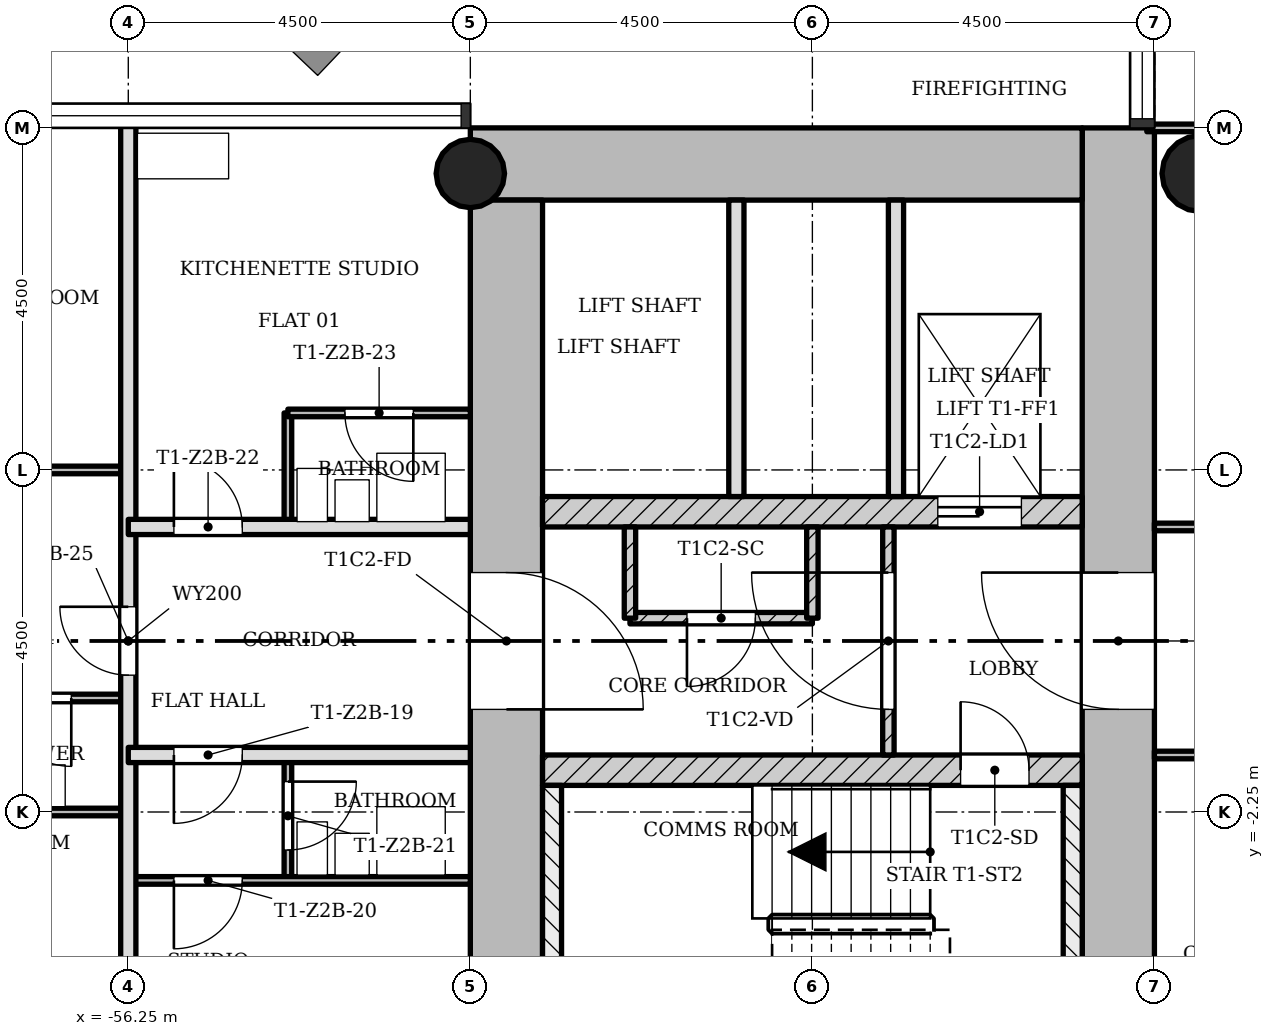
"""IFC4 building model, lengths in metres.
Left out: names, types, materials, properties, quantities, classifications, styles, units other than length and angle.
Written with IfcOpenShell. Run it as: python <this file> out.ifc"""

import sys

from ifc_helpers import new_model, si_unit, direction, frame, frame_2d, origin, origin_2d, place, context, subcontext, project, spatial, rectangle, hollow_circle, extrude, element, fill, save


model = new_model("IFC4")
c1 = context("Model", 3, precision=1e-05, world=origin(), true_north=direction((0.0, 1.0)))
c2 = subcontext(c1, "Body", "Model", "MODEL_VIEW")
j1 = project(units=[si_unit("LENGTHUNIT", "METRE"), si_unit("PLANEANGLEUNIT", "RADIAN")], contexts=[c1])
p1 = place(None, origin())
s1 = spatial("IfcSite", under=j1, at=p1, CompositionType="ELEMENT")
p2 = place(p1, origin())
s2 = spatial("IfcBuilding", under=s1, at=p2, CompositionType="ELEMENT")
p3 = place(p2, frame((0.0, 0.0, 80.0)))
s3 = spatial("IfcBuildingStorey", under=s2, at=p3, CompositionType="ELEMENT", Elevation=80.0)
p4 = place(p3, frame((-43.225, -5.8, 0.0), z_axis=(0.0, 0.0, 1.0), x_axis=(0.0, 1.0, 0.0)))
e1 = element("IfcWall", 1, at=p4, inside=s3, PredefinedType="SHEAR", context=c2, shape_type="SweptSolid", body=[
    extrude(rectangle(XDim=12.55, YDim=0.95, at=frame_2d((6.275, 0.0))), origin(), (0.0, 0.0, 1.0), 3.4),
])
p5 = place(p4, frame((4.9, 0.0, 0.0)))
e2 = element("IfcOpeningElement", 2, at=p5, cuts=e1, PredefinedType="OPENING", context=c2, shape_type="SweptSolid", body=[
    extrude(rectangle(XDim=1.8, YDim=2.1, at=frame_2d((0.9, 1.05))), frame((0.0, 0.485, 0.0), z_axis=(0.0, -1.0, 0.0), x_axis=(1.0, 0.0, 0.0)), (0.0, 0.0, 1.0), 0.97),
])
p6 = place(p3, frame((-43.7, 6.275, 0.0), z_axis=(0.0, 0.0, 1.0), x_axis=(-1.0, 0.0, 0.0)))
e3 = element("IfcWall", 3, at=p6, inside=s3, PredefinedType="SHEAR", context=c2, shape_type="SweptSolid", body=[
    extrude(rectangle(XDim=8.05, YDim=0.95, at=frame_2d((4.025, 0.0))), origin(), (0.0, 0.0, 1.0), 3.4),
])
p7 = place(p3, frame((-51.275, 5.8, 0.0), z_axis=(0.0, 0.0, 1.0), x_axis=(0.0, -1.0, 0.0)))
e4 = element("IfcWall", 4, at=p7, inside=s3, PredefinedType="SHEAR", context=c2, shape_type="SweptSolid", body=[
    extrude(rectangle(XDim=12.55, YDim=0.95, at=frame_2d((6.275, 0.0))), origin(), (0.0, 0.0, 1.0), 3.4),
])
p8 = place(p7, frame((4.9, 0.0, 0.0)))
e5 = element("IfcOpeningElement", 5, at=p8, cuts=e4, PredefinedType="OPENING", context=c2, shape_type="SweptSolid", body=[
    extrude(rectangle(XDim=1.8, YDim=2.1, at=frame_2d((0.9, 1.05))), frame((0.0, 0.485, 0.0), z_axis=(0.0, -1.0, 0.0), x_axis=(1.0, 0.0, 0.0)), (0.0, 0.0, 1.0), 0.97),
])
p9 = place(p3, frame((-50.8, -1.7, 0.0), z_axis=(0.0, 0.0, 1.0), x_axis=(1.0, 0.0, 0.0)))
e6 = element("IfcWall", 6, at=p9, inside=s3, PredefinedType="SHEAR", context=c2, shape_type="SweptSolid", body=[
    extrude(rectangle(XDim=7.1, YDim=0.4, at=frame_2d((3.55, 0.0))), origin(), (0.0, 0.0, 1.0), 3.4),
])
p10 = place(p9, frame((5.5, 0.0, 0.0)))
e7 = element("IfcOpeningElement", 7, at=p10, cuts=e6, PredefinedType="OPENING", context=c2, shape_type="SweptSolid", body=[
    extrude(rectangle(XDim=0.9, YDim=2.1, at=frame_2d((0.45, 1.05))), frame((0.0, 0.21, 0.0), z_axis=(0.0, -1.0, 0.0), x_axis=(1.0, 0.0, 0.0)), (0.0, 0.0, 1.0), 0.42),
])
p11 = place(p3, frame((-50.8, 1.7, 0.0), z_axis=(0.0, 0.0, 1.0), x_axis=(1.0, 0.0, 0.0)))
e8 = element("IfcWall", 8, at=p11, inside=s3, PredefinedType="SHEAR", context=c2, shape_type="SweptSolid", body=[
    extrude(rectangle(XDim=7.1, YDim=0.4, at=frame_2d((3.55, 0.0))), origin(), (0.0, 0.0, 1.0), 3.4),
])
p12 = place(p11, frame((5.2, 0.0, 0.0)))
e9 = element("IfcOpeningElement", 9, at=p12, cuts=e8, PredefinedType="OPENING", context=c2, shape_type="SweptSolid", body=[
    extrude(rectangle(XDim=1.1, YDim=2.1, at=frame_2d((0.55, 1.05))), frame((0.0, 0.21, 0.0), z_axis=(0.0, -1.0, 0.0), x_axis=(1.0, 0.0, 0.0)), (0.0, 0.0, 1.0), 0.42),
])
p13 = place(p3, frame((-51.75, 6.15, 0.0), z_axis=(0.0, 0.0, 1.0), x_axis=(1.0, 0.0, 0.0)))
e10 = element("IfcColumn", 10, at=p13, inside=s3, PredefinedType="COLUMN", context=c2, shape_type="SweptSolid", body=[
    extrude(hollow_circle(Radius=0.45, WallThickness=0.032, at=origin_2d()), origin(), (0.0, 0.0, 1.0), 3.4),
])
p14 = place(p3, frame((-42.15, 6.15, 0.0), z_axis=(0.0, 0.0, 1.0), x_axis=(1.0, 0.0, 0.0)))
e11 = element("IfcColumn", 11, at=p14, inside=s3, PredefinedType="COLUMN", context=c2, shape_type="SweptSolid", body=[
    extrude(hollow_circle(Radius=0.5, WallThickness=0.036, at=origin_2d()), origin(), (0.0, 0.0, 1.0), 3.4),
])
p15 = place(p3, frame((-46.25, 1.5, 0.0), z_axis=(0.0, 0.0, 1.0), x_axis=(0.0, -1.0, 0.0)))
e12 = element("IfcWall", 12, at=p15, inside=s3, PredefinedType="PARTITIONING", context=c2, shape_type="SweptSolid", body=[
    extrude(rectangle(XDim=3.0, YDim=0.15, at=frame_2d((1.5, 0.0))), origin(), (0.0, 0.0, 1.0), 3.0),
])
p16 = place(p15, frame((0.6, 0.0, 0.0)))
e13 = element("IfcOpeningElement", 13, at=p16, cuts=e12, PredefinedType="OPENING", context=c2, shape_type="SweptSolid", body=[
    extrude(rectangle(XDim=1.8, YDim=2.1, at=frame_2d((0.9, 1.05))), frame((0.0, 0.085, 0.0), z_axis=(0.0, -1.0, 0.0), x_axis=(1.0, 0.0, 0.0)), (0.0, 0.0, 1.0), 0.17),
])
for number, where, z_axis, x_axis in (
    (14, (-46.15, 5.8, 0.0), (0.0, 0.0, 1.0), (0.0, -1.0, 0.0)),
    (15, (-48.25, 5.8, 0.0), (0.0, 0.0, 1.0), (0.0, -1.0, 0.0)),
):
    element("IfcWall", number, at=place(p3, frame(where, z_axis=z_axis, x_axis=x_axis)), inside=s3, PredefinedType="SOLIDWALL", context=c2, shape_type="SweptSolid", body=[
        extrude(rectangle(XDim=3.9, YDim=0.2, at=frame_2d((1.95, 0.0))), origin(), (0.0, 0.0, 1.0), 3.0),
    ])
p17 = place(p3, frame((-47.25, 0.3, 0.0), z_axis=(0.0, 0.0, 1.0), x_axis=(-1.0, 0.0, 0.0)))
e16 = element("IfcWall", 16, at=p17, inside=s3, PredefinedType="PARTITIONING", context=c2, shape_type="SweptSolid", body=[
    extrude(rectangle(XDim=2.4, YDim=0.15, at=frame_2d((1.2, 0.0))), origin(), (0.0, 0.0, 1.0), 3.0),
])
p18 = place(p17, frame((0.75, 0.0, 0.0)))
e17 = element("IfcOpeningElement", 17, at=p18, cuts=e16, PredefinedType="OPENING", context=c2, shape_type="SweptSolid", body=[
    extrude(rectangle(XDim=0.9, YDim=2.1, at=frame_2d((0.45, 1.05))), frame((0.0, 0.085, 0.0), z_axis=(0.0, -1.0, 0.0), x_axis=(1.0, 0.0, 0.0)), (0.0, 0.0, 1.0), 0.17),
])
for number, where, z_axis, x_axis in (
    (18, (-47.25, 0.3, 0.0), (0.0, 0.0, 1.0), (0.0, 1.0, 0.0)),
    (19, (-49.65, 0.3, 0.0), (0.0, 0.0, 1.0), (0.0, 1.0, 0.0)),
):
    element("IfcWall", number, at=place(p3, frame(where, z_axis=z_axis, x_axis=x_axis)), inside=s3, PredefinedType="PARTITIONING", context=c2, shape_type="SweptSolid", body=[
        extrude(rectangle(XDim=1.2, YDim=0.15, at=frame_2d((0.6, 0.0))), origin(), (0.0, 0.0, 1.0), 3.0),
    ])
p19 = place(p3, frame((-56.25, -6.85, 0.0), z_axis=(0.0, 0.0, 1.0), x_axis=(0.0, 1.0, 0.0)))
e20 = element("IfcWall", 20, at=p19, inside=s3, PredefinedType="SOLIDWALL", context=c2, shape_type="SweptSolid", body=[
    extrude(rectangle(XDim=13.7, YDim=0.2, at=frame_2d((6.85, 0.0))), origin(), (0.0, 0.0, 1.0), 3.0),
])
p20 = place(p19, frame((6.4, 0.0, 0.0)))
e21 = element("IfcOpeningElement", 21, at=p20, cuts=e20, PredefinedType="OPENING", context=c2, shape_type="SweptSolid", body=[
    extrude(rectangle(XDim=0.9, YDim=2.1, at=frame_2d((0.45, 1.05))), frame((0.0, 0.11, 0.0), z_axis=(0.0, -1.0, 0.0), x_axis=(1.0, 0.0, 0.0)), (0.0, 0.0, 1.0), 0.22),
])
p21 = place(p3, frame((-54.15, -3.15, 0.0), z_axis=(0.0, 0.0, 1.0), x_axis=(0.0, 1.0, 0.0)))
e22 = element("IfcWall", 22, at=p21, inside=s3, PredefinedType="PARTITIONING", context=c2, shape_type="SweptSolid", body=[
    extrude(rectangle(XDim=1.65, YDim=0.1, at=frame_2d((0.825, 0.0))), origin(), (0.0, 0.0, 1.0), 3.0),
])
p22 = place(p21, frame((0.4, 0.0, 0.0)))
e23 = element("IfcOpeningElement", 23, at=p22, cuts=e22, PredefinedType="OPENING", context=c2, shape_type="SweptSolid", body=[
    extrude(rectangle(XDim=0.9, YDim=2.1, at=frame_2d((0.45, 1.05))), frame((0.0, 0.06, 0.0), z_axis=(0.0, -1.0, 0.0), x_axis=(1.0, 0.0, 0.0)), (0.0, 0.0, 1.0), 0.12),
])
p23 = place(p3, frame((-54.15, 1.5, 0.0), z_axis=(0.0, 0.0, 1.0), x_axis=(0.0, 1.0, 0.0)))
e24 = element("IfcWall", 24, at=p23, inside=s3, PredefinedType="PARTITIONING", context=c2, shape_type="SweptSolid", body=[
    extrude(rectangle(XDim=1.5, YDim=0.1, at=frame_2d((0.75, 0.0))), origin(), (0.0, 0.0, 1.0), 3.0),
])
p24 = place(p3, frame((-56.25, -3.15, 0.0), z_axis=(0.0, 0.0, 1.0), x_axis=(1.0, 0.0, 0.0)))
e25 = element("IfcWall", 25, at=p24, inside=s3, PredefinedType="PARTITIONING", context=c2, shape_type="SweptSolid", body=[
    extrude(rectangle(XDim=4.5, YDim=0.1, at=frame_2d((2.25, 0.0))), origin(), (0.0, 0.0, 1.0), 3.0),
])
p25 = place(p24, frame((0.6, 0.0, 0.0)))
e26 = element("IfcOpeningElement", 26, at=p25, cuts=e25, PredefinedType="OPENING", context=c2, shape_type="SweptSolid", body=[
    extrude(rectangle(XDim=0.9, YDim=2.1, at=frame_2d((0.45, 1.05))), frame((0.0, 0.06, 0.0), z_axis=(0.0, -1.0, 0.0), x_axis=(1.0, 0.0, 0.0)), (0.0, 0.0, 1.0), 0.12),
])
p26 = place(p3, frame((-60.85, -2.25, 0.0), z_axis=(0.0, 0.0, 1.0), x_axis=(1.0, 0.0, 0.0)))
e27 = element("IfcWall", 27, at=p26, inside=s3, PredefinedType="PARTITIONING", context=c2, shape_type="SweptSolid", body=[
    extrude(rectangle(XDim=4.6, YDim=0.1, at=frame_2d((2.3, 0.0))), origin(), (0.0, 0.0, 1.0), 3.0),
])
p27 = place(p26, frame((1.25, 0.0, 0.0)))
e28 = element("IfcOpeningElement", 28, at=p27, cuts=e27, PredefinedType="OPENING", context=c2, shape_type="SweptSolid", body=[
    extrude(rectangle(XDim=0.9, YDim=2.1, at=frame_2d((0.45, 1.05))), frame((0.0, 0.06, 0.0), z_axis=(0.0, -1.0, 0.0), x_axis=(1.0, 0.0, 0.0)), (0.0, 0.0, 1.0), 0.12),
])
p28 = place(p3, frame((-42.75, -1.5, 0.0), z_axis=(0.0, 0.0, 1.0), x_axis=(1.0, 0.0, 0.0)))
e29 = element("IfcWall", 29, at=p28, inside=s3, PredefinedType="PARTITIONING", context=c2, shape_type="SweptSolid", body=[
    extrude(rectangle(XDim=5.85, YDim=0.1, at=frame_2d((2.925, 0.0))), origin(), (0.0, 0.0, 1.0), 3.0),
])
p29 = place(p28, frame((0.975, 0.0, 0.0)))
e30 = element("IfcOpeningElement", 30, at=p29, cuts=e29, PredefinedType="OPENING", context=c2, shape_type="SweptSolid", body=[
    extrude(rectangle(XDim=0.9, YDim=2.1, at=frame_2d((0.45, 1.05))), frame((0.0, 0.06, 0.0), z_axis=(0.0, -1.0, 0.0), x_axis=(1.0, 0.0, 0.0)), (0.0, 0.0, 1.0), 0.12),
])
p30 = place(p3, frame((-56.25, -1.5, 0.0), z_axis=(0.0, 0.0, 1.0), x_axis=(1.0, 0.0, 0.0)))
e31 = element("IfcWall", 31, at=p30, inside=s3, PredefinedType="SOLIDWALL", context=c2, shape_type="SweptSolid", body=[
    extrude(rectangle(XDim=4.5, YDim=0.2, at=frame_2d((2.25, 0.0))), origin(), (0.0, 0.0, 1.0), 3.0),
])
p31 = place(p30, frame((0.6, 0.0, 0.0)))
e32 = element("IfcOpeningElement", 32, at=p31, cuts=e31, PredefinedType="OPENING", context=c2, shape_type="SweptSolid", body=[
    extrude(rectangle(XDim=0.9, YDim=2.1, at=frame_2d((0.45, 1.05))), frame((0.0, 0.11, 0.0), z_axis=(0.0, -1.0, 0.0), x_axis=(1.0, 0.0, 0.0)), (0.0, 0.0, 1.0), 0.22),
])
p32 = place(p3, frame((-58.65, -0.75, 0.0), z_axis=(0.0, 0.0, 1.0), x_axis=(1.0, 0.0, 0.0)))
e33 = element("IfcWall", 33, at=p32, inside=s3, PredefinedType="PARTITIONING", context=c2, shape_type="SweptSolid", body=[
    extrude(rectangle(XDim=2.4, YDim=0.1, at=frame_2d((1.2, 0.0))), origin(), (0.0, 0.0, 1.0), 3.0),
])
p33 = place(p32, frame((0.75, 0.0, 0.0)))
e34 = element("IfcOpeningElement", 34, at=p33, cuts=e33, PredefinedType="OPENING", context=c2, shape_type="SweptSolid", body=[
    extrude(rectangle(XDim=0.9, YDim=2.1, at=frame_2d((0.45, 1.05))), frame((0.0, 0.06, 0.0), z_axis=(0.0, -1.0, 0.0), x_axis=(1.0, 0.0, 0.0)), (0.0, 0.0, 1.0), 0.12),
])
p34 = place(p3, frame((-42.75, 1.5, 0.0), z_axis=(0.0, 0.0, 1.0), x_axis=(1.0, 0.0, 0.0)))
e35 = element("IfcWall", 35, at=p34, inside=s3, PredefinedType="PARTITIONING", context=c2, shape_type="SweptSolid", body=[
    extrude(rectangle(XDim=5.85, YDim=0.1, at=frame_2d((2.925, 0.0))), origin(), (0.0, 0.0, 1.0), 3.0),
])
p35 = place(p34, frame((1.575, 0.0, 0.0)))
e36 = element("IfcOpeningElement", 36, at=p35, cuts=e35, PredefinedType="OPENING", context=c2, shape_type="SweptSolid", body=[
    extrude(rectangle(XDim=0.9, YDim=2.1, at=frame_2d((0.45, 1.05))), frame((0.0, 0.06, 0.0), z_axis=(0.0, -1.0, 0.0), x_axis=(1.0, 0.0, 0.0)), (0.0, 0.0, 1.0), 0.12),
])
p36 = place(p3, frame((-56.25, 1.5, 0.0), z_axis=(0.0, 0.0, 1.0), x_axis=(1.0, 0.0, 0.0)))
e37 = element("IfcWall", 37, at=p36, inside=s3, PredefinedType="SOLIDWALL", context=c2, shape_type="SweptSolid", body=[
    extrude(rectangle(XDim=4.5, YDim=0.2, at=frame_2d((2.25, 0.0))), origin(), (0.0, 0.0, 1.0), 3.0),
])
p37 = place(p36, frame((0.6, 0.0, 0.0)))
e38 = element("IfcOpeningElement", 38, at=p37, cuts=e37, PredefinedType="OPENING", context=c2, shape_type="SweptSolid", body=[
    extrude(rectangle(XDim=0.9, YDim=2.1, at=frame_2d((0.45, 1.05))), frame((0.0, 0.11, 0.0), z_axis=(0.0, -1.0, 0.0), x_axis=(1.0, 0.0, 0.0)), (0.0, 0.0, 1.0), 0.22),
])
p38 = place(p3, frame((-60.85, 2.25, 0.0), z_axis=(0.0, 0.0, 1.0), x_axis=(1.0, 0.0, 0.0)))
e39 = element("IfcWall", 39, at=p38, inside=s3, PredefinedType="PARTITIONING", context=c2, shape_type="SweptSolid", body=[
    extrude(rectangle(XDim=4.6, YDim=0.1, at=frame_2d((2.3, 0.0))), origin(), (0.0, 0.0, 1.0), 3.0),
])
p39 = place(p38, frame((1.9, 0.0, 0.0)))
e40 = element("IfcOpeningElement", 40, at=p39, cuts=e39, PredefinedType="OPENING", context=c2, shape_type="SweptSolid", body=[
    extrude(rectangle(XDim=0.9, YDim=2.1, at=frame_2d((0.45, 1.05))), frame((0.0, 0.06, 0.0), z_axis=(0.0, -1.0, 0.0), x_axis=(1.0, 0.0, 0.0)), (0.0, 0.0, 1.0), 0.12),
])
p40 = place(p3, frame((-54.15, 3.0, 0.0), z_axis=(0.0, 0.0, 1.0), x_axis=(1.0, 0.0, 0.0)))
e41 = element("IfcWall", 41, at=p40, inside=s3, PredefinedType="PARTITIONING", context=c2, shape_type="SweptSolid", body=[
    extrude(rectangle(XDim=2.4, YDim=0.1, at=frame_2d((1.2, 0.0))), origin(), (0.0, 0.0, 1.0), 3.0),
])
p41 = place(p40, frame((0.75, 0.0, 0.0)))
e42 = element("IfcOpeningElement", 42, at=p41, cuts=e41, PredefinedType="OPENING", context=c2, shape_type="SweptSolid", body=[
    extrude(rectangle(XDim=0.9, YDim=2.1, at=frame_2d((0.45, 1.05))), frame((0.0, 0.06, 0.0), z_axis=(0.0, -1.0, 0.0), x_axis=(1.0, 0.0, 0.0)), (0.0, 0.0, 1.0), 0.12),
])
p42 = place(p3, frame((-42.85, 6.75, 0.0), z_axis=(0.0, 0.0, 1.0), x_axis=(1.0, 0.0, 0.0)))
e43 = element("IfcWall", 43, at=p42, inside=s3, PredefinedType="PARTITIONING", context=c2, shape_type="SweptSolid", body=[
    extrude(rectangle(XDim=5.95, YDim=0.1, at=frame_2d((2.975, 0.0))), origin(), (0.0, 0.0, 1.0), 3.0),
])
for number, where, z_axis, x_axis in (
    (44, (-50.675, -1.9, 0.0), (0.0, 0.0, 1.0), (0.0, -1.0, 0.0)),
    (45, (-43.825, -1.9, 0.0), (0.0, 0.0, 1.0), (0.0, -1.0, 0.0)),
):
    element("IfcWall", number, at=place(p3, frame(where, z_axis=z_axis, x_axis=x_axis)), inside=s3, PredefinedType="SHEAR", context=c2, shape_type="SweptSolid", body=[
        extrude(rectangle(XDim=3.9, YDim=0.25, at=frame_2d((1.95, 0.0))), origin(), (0.0, 0.0, 1.0), 3.4),
    ])
p43 = place(p16, origin())
e46 = element("IfcDoor", 46, at=p43, inside=s3, OperationType="SINGLE_SWING_LEFT", PredefinedType="DOOR", context=c2, shape_type="SweptSolid", body=[
    extrude(rectangle(XDim=1.8, YDim=2.1, at=frame_2d((0.9, 1.05))), frame((0.0, 0.025, 0.0), z_axis=(0.0, -1.0, 0.0), x_axis=(1.0, 0.0, 0.0)), (0.0, 0.0, 1.0), 0.05),
])
fill(e13, e46)
p44 = place(p18, origin())
e47 = element("IfcDoor", 47, at=p44, inside=s3, OperationType="SINGLE_SWING_LEFT", PredefinedType="DOOR", context=c2, shape_type="SweptSolid", body=[
    extrude(rectangle(XDim=0.9, YDim=2.1, at=frame_2d((0.45, 1.05))), frame((0.0, 0.025, 0.0), z_axis=(0.0, -1.0, 0.0), x_axis=(1.0, 0.0, 0.0)), (0.0, 0.0, 1.0), 0.05),
])
fill(e17, e47)
p45 = place(p31, origin())
e48 = element("IfcDoor", 48, at=p45, inside=s3, OperationType="SINGLE_SWING_LEFT", PredefinedType="DOOR", context=c2, shape_type="SweptSolid", body=[
    extrude(rectangle(XDim=0.9, YDim=2.1, at=frame_2d((0.45, 1.05))), frame((0.0, 0.025, 0.0), z_axis=(0.0, -1.0, 0.0), x_axis=(1.0, 0.0, 0.0)), (0.0, 0.0, 1.0), 0.05),
])
fill(e32, e48)
p46 = place(p25, origin())
e49 = element("IfcDoor", 49, at=p46, inside=s3, OperationType="SINGLE_SWING_LEFT", PredefinedType="DOOR", context=c2, shape_type="SweptSolid", body=[
    extrude(rectangle(XDim=0.9, YDim=2.1, at=frame_2d((0.45, 1.05))), frame((0.0, 0.025, 0.0), z_axis=(0.0, -1.0, 0.0), x_axis=(1.0, 0.0, 0.0)), (0.0, 0.0, 1.0), 0.05),
])
fill(e26, e49)
p47 = place(p22, origin())
e50 = element("IfcDoor", 50, at=p47, inside=s3, OperationType="SINGLE_SWING_RIGHT", PredefinedType="DOOR", context=c2, shape_type="SweptSolid", body=[
    extrude(rectangle(XDim=0.9, YDim=2.1, at=frame_2d((0.45, 1.05))), frame((0.0, 0.025, 0.0), z_axis=(0.0, -1.0, 0.0), x_axis=(1.0, 0.0, 0.0)), (0.0, 0.0, 1.0), 0.05),
])
fill(e23, e50)
p48 = place(p37, origin())
e51 = element("IfcDoor", 51, at=p48, inside=s3, OperationType="SINGLE_SWING_RIGHT", PredefinedType="DOOR", context=c2, shape_type="SweptSolid", body=[
    extrude(rectangle(XDim=0.9, YDim=2.1, at=frame_2d((0.45, 1.05))), frame((0.0, 0.025, 0.0), z_axis=(0.0, -1.0, 0.0), x_axis=(1.0, 0.0, 0.0)), (0.0, 0.0, 1.0), 0.05),
])
fill(e38, e51)
p49 = place(p41, origin())
e52 = element("IfcDoor", 52, at=p49, inside=s3, OperationType="SINGLE_SWING_RIGHT", PredefinedType="DOOR", context=c2, shape_type="SweptSolid", body=[
    extrude(rectangle(XDim=0.9, YDim=2.1, at=frame_2d((0.45, 1.05))), frame((0.0, 0.025, 0.0), z_axis=(0.0, -1.0, 0.0), x_axis=(1.0, 0.0, 0.0)), (0.0, 0.0, 1.0), 0.05),
])
fill(e42, e52)
p50 = place(p33, origin())
e53 = element("IfcDoor", 53, at=p50, inside=s3, OperationType="SINGLE_SWING_RIGHT", PredefinedType="DOOR", context=c2, shape_type="SweptSolid", body=[
    extrude(rectangle(XDim=0.9, YDim=2.1, at=frame_2d((0.45, 1.05))), frame((0.0, 0.025, 0.0), z_axis=(0.0, -1.0, 0.0), x_axis=(1.0, 0.0, 0.0)), (0.0, 0.0, 1.0), 0.05),
])
fill(e34, e53)
p51 = place(p20, origin())
e54 = element("IfcDoor", 54, at=p51, inside=s3, OperationType="SINGLE_SWING_LEFT", PredefinedType="DOOR", context=c2, shape_type="SweptSolid", body=[
    extrude(rectangle(XDim=0.9, YDim=2.1, at=frame_2d((0.45, 1.05))), frame((0.0, 0.025, 0.0), z_axis=(0.0, -1.0, 0.0), x_axis=(1.0, 0.0, 0.0)), (0.0, 0.0, 1.0), 0.05),
])
fill(e21, e54)
p52 = place(p10, origin())
e55 = element("IfcDoor", 55, at=p52, inside=s3, OperationType="SINGLE_SWING_RIGHT", PredefinedType="DOOR", context=c2, shape_type="SweptSolid", body=[
    extrude(rectangle(XDim=0.9, YDim=2.1, at=frame_2d((0.45, 1.05))), frame((0.0, 0.025, 0.0), z_axis=(0.0, -1.0, 0.0), x_axis=(1.0, 0.0, 0.0)), (0.0, 0.0, 1.0), 0.05),
])
fill(e7, e55)
p53 = place(p12, origin())
e56 = element("IfcDoor", 56, at=p53, inside=s3, OperationType="SLIDING_TO_LEFT", PredefinedType="DOOR", context=c2, shape_type="SweptSolid", body=[
    extrude(rectangle(XDim=1.1, YDim=2.1, at=frame_2d((0.55, 1.05))), frame((0.0, 0.025, 0.0), z_axis=(0.0, -1.0, 0.0), x_axis=(1.0, 0.0, 0.0)), (0.0, 0.0, 1.0), 0.05),
])
fill(e9, e56)
p54 = place(p5, origin())
e57 = element("IfcDoor", 57, at=p54, inside=s3, OperationType="SINGLE_SWING_LEFT", PredefinedType="DOOR", context=c2, shape_type="SweptSolid", body=[
    extrude(rectangle(XDim=1.8, YDim=2.1, at=frame_2d((0.9, 1.05))), frame((0.0, 0.025, 0.0), z_axis=(0.0, -1.0, 0.0), x_axis=(1.0, 0.0, 0.0)), (0.0, 0.0, 1.0), 0.05),
])
fill(e2, e57)
p55 = place(p8, origin())
e58 = element("IfcDoor", 58, at=p55, inside=s3, OperationType="SINGLE_SWING_LEFT", PredefinedType="DOOR", context=c2, shape_type="SweptSolid", body=[
    extrude(rectangle(XDim=1.8, YDim=2.1, at=frame_2d((0.9, 1.05))), frame((0.0, 0.025, 0.0), z_axis=(0.0, -1.0, 0.0), x_axis=(1.0, 0.0, 0.0)), (0.0, 0.0, 1.0), 0.05),
])
fill(e5, e58)
save(model, sys.argv[1])
